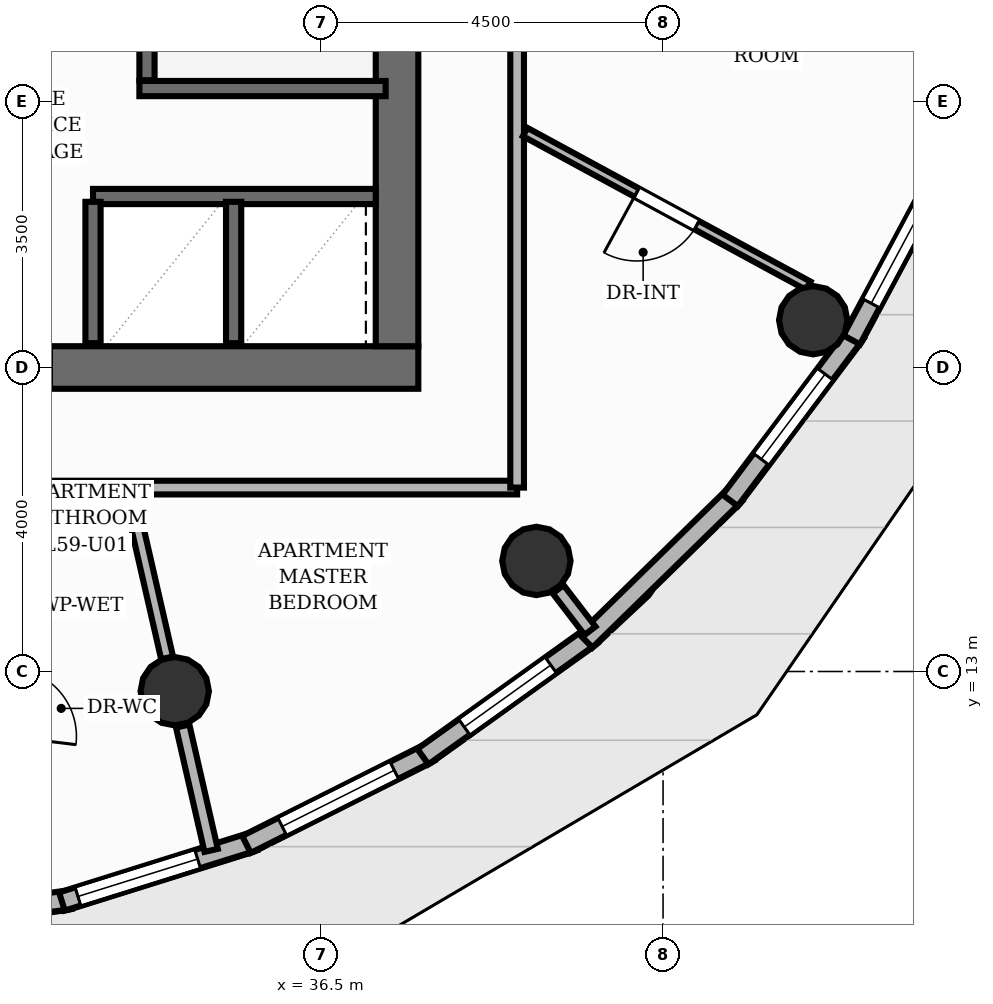
"""IFC4 building model, lengths in metres.
Left out: names, types, materials, properties, quantities, classifications, styles, units other than length and angle.
Written with IfcOpenShell. Run it as: python <this file> out.ifc"""

import sys

from ifc_helpers import new_model, si_unit, direction, frame, frame_2d, origin, origin_2d, place, context, subcontext, project, spatial, rectangle, circle, extrude, element, fill, save


model = new_model("IFC4")
c1 = context("Model", 3, precision=1e-05, world=origin(), true_north=direction((0.0, 1.0)))
c2 = subcontext(c1, "Body", "Model", "MODEL_VIEW")
j1 = project(units=[si_unit("LENGTHUNIT", "METRE"), si_unit("PLANEANGLEUNIT", "RADIAN")], contexts=[c1])
p1 = place(None, origin())
s1 = spatial("IfcSite", under=j1, at=p1, CompositionType="ELEMENT")
p2 = place(p1, origin())
s2 = spatial("IfcBuilding", under=s1, at=p2, CompositionType="ELEMENT")
p3 = place(p2, frame((0.0, 0.0, 198.24)))
s3 = spatial("IfcBuildingStorey", under=s2, at=p3, CompositionType="ELEMENT", Elevation=198.24)
p4 = place(p3, frame((26.22, 17.0, 0.0), z_axis=(0.0, 0.0, 1.0), x_axis=(1.0, 0.0, 0.0)))
e1 = element("IfcWall", 1, at=p4, inside=s3, PredefinedType="SHEAR", context=c2, shape_type="SweptSolid", body=[
    extrude(rectangle(XDim=11.56, YDim=0.56, at=frame_2d((5.78, 0.0))), origin(), (0.0, 0.0, 1.0), 3.2),
])
p5 = place(p4, frame((2.28, 0.0, 0.0)))
e2 = element("IfcOpeningElement", 2, at=p5, cuts=e1, PredefinedType="OPENING", context=c2, shape_type="SweptSolid", body=[
    extrude(rectangle(XDim=1.1, YDim=2.15, at=frame_2d((0.55, 1.075))), frame((0.0, 0.29, 0.0), z_axis=(0.0, -1.0, 0.0), x_axis=(1.0, 0.0, 0.0)), (0.0, 0.0, 1.0), 0.58),
])
p6 = place(p4, frame((5.83, 0.0, 0.0)))
e3 = element("IfcOpeningElement", 3, at=p6, cuts=e1, PredefinedType="OPENING", context=c2, shape_type="SweptSolid", body=[
    extrude(rectangle(XDim=0.9, YDim=2.1, at=frame_2d((0.45, 1.05))), frame((0.0, 0.29, 0.0), z_axis=(0.0, -1.0, 0.0), x_axis=(1.0, 0.0, 0.0)), (0.0, 0.0, 1.0), 0.58),
])
p7 = place(p3, frame((37.5, 17.28, 0.0), z_axis=(0.0, 0.0, 1.0), x_axis=(0.0, 1.0, 0.0)))
e4 = element("IfcWall", 4, at=p7, inside=s3, PredefinedType="SHEAR", context=c2, shape_type="SweptSolid", body=[
    extrude(rectangle(XDim=13.44, YDim=0.56, at=frame_2d((6.72, 0.0))), origin(), (0.0, 0.0, 1.0), 3.2),
])
for number, where, z_axis, x_axis in (
    (5, (34.575, 12.74, 0.0), (0.0, 0.0, 1.0), (1.0, 0.0, 0.0)),
    (6, (39.333, 14.455, 0.0), (0.0, 0.0, 1.0), (1.0, 0.0, 0.0)),
    (7, (42.975, 17.622, 0.0), (0.0, 0.0, 1.0), (1.0, 0.0, 0.0)),
):
    element("IfcColumn", number, at=place(p3, frame(where, z_axis=z_axis, x_axis=x_axis)), inside=s3, PredefinedType="COLUMN", context=c2, shape_type="SweptSolid", body=[
        extrude(circle(Radius=0.45, at=origin_2d()), origin(), (0.0, 0.0, 1.0), 3.2),
    ])
p8 = place(p3, frame((33.199, 9.998, 0.0), z_axis=(0.0, 0.0, 1.0), x_axis=(-0.990951844978, -0.134217886046, 0.0)))
e8 = element("IfcWall", 8, at=p8, inside=s3, PredefinedType="SOLIDWALL", context=c2, shape_type="SweptSolid", body=[
    extrude(rectangle(XDim=2.592, YDim=0.25, at=frame_2d((1.296, 0.0))), origin(), (0.0, 0.0, 1.0), 2.96),
])
p9 = place(p3, frame((35.621, 10.766, 0.0), z_axis=(0.0, 0.0, 1.0), x_axis=(-0.954307768746, -0.298825505122, 0.0)))
e9 = element("IfcWall", 9, at=p9, inside=s3, PredefinedType="SOLIDWALL", context=c2, shape_type="SweptSolid", body=[
    extrude(rectangle(XDim=2.651, YDim=0.25, at=frame_2d((1.326, 0.0))), origin(), (0.0, 0.0, 1.0), 2.96),
])
p10 = place(p9, frame((0.78, 0.0, 0.85)))
e10 = element("IfcOpeningElement", 10, at=p10, cuts=e9, PredefinedType="OPENING", context=c2, shape_type="SweptSolid", body=[
    extrude(rectangle(XDim=1.65, YDim=1.52, at=frame_2d((0.825, 0.76))), frame((0.0, 0.135, 0.0), z_axis=(0.0, -1.0, 0.0), x_axis=(1.0, 0.0, 0.0)), (0.0, 0.0, 1.0), 0.27),
])
p11 = place(p3, frame((37.934, 11.937, 0.0), z_axis=(0.0, 0.0, 1.0), x_axis=(-0.893757522153, -0.448550433724, 0.0)))
e11 = element("IfcWall", 11, at=p11, inside=s3, PredefinedType="SOLIDWALL", context=c2, shape_type="SweptSolid", body=[
    extrude(rectangle(XDim=2.702, YDim=0.25, at=frame_2d((1.351, 0.0))), origin(), (0.0, 0.0, 1.0), 2.96),
])
p12 = place(p11, frame((0.526, 0.0, 0.85)))
e12 = element("IfcOpeningElement", 12, at=p12, cuts=e11, PredefinedType="OPENING", context=c2, shape_type="SweptSolid", body=[
    extrude(rectangle(XDim=1.65, YDim=1.55, at=frame_2d((0.825, 0.775))), frame((0.0, 0.135, 0.0), z_axis=(0.0, -1.0, 0.0), x_axis=(1.0, 0.0, 0.0)), (0.0, 0.0, 1.0), 0.27),
])
p13 = place(p3, frame((40.066, 13.474, 0.0), z_axis=(0.0, 0.0, 1.0), x_axis=(-0.812997900305, -0.58226661771, 0.0)))
e13 = element("IfcWall", 13, at=p13, inside=s3, PredefinedType="SOLIDWALL", context=c2, shape_type="SweptSolid", body=[
    extrude(rectangle(XDim=2.739, YDim=0.25, at=frame_2d((1.369, 0.0))), origin(), (0.0, 0.0, 1.0), 2.96),
])
p14 = place(p13, frame((0.669, 0.0, 0.85)))
e14 = element("IfcOpeningElement", 14, at=p14, cuts=e13, PredefinedType="OPENING", context=c2, shape_type="SweptSolid", body=[
    extrude(rectangle(XDim=1.4, YDim=1.55, at=frame_2d((0.7, 0.775))), frame((0.0, 0.135, 0.0), z_axis=(0.0, -1.0, 0.0), x_axis=(1.0, 0.0, 0.0)), (0.0, 0.0, 1.0), 0.27),
])
p15 = place(p3, frame((41.955, 15.333, 0.0), z_axis=(0.0, 0.0, 1.0), x_axis=(-0.71485422762, -0.699273503898, 0.0)))
e15 = element("IfcWall", 15, at=p15, inside=s3, PredefinedType="SOLIDWALL", context=c2, shape_type="SweptSolid", body=[
    extrude(rectangle(XDim=2.758, YDim=0.25, at=frame_2d((1.379, 0.0))), origin(), (0.0, 0.0, 1.0), 2.96),
])
p16 = place(p3, frame((43.54, 17.456, 0.0), z_axis=(0.0, 0.0, 1.0), x_axis=(-0.600877762795, -0.799340924874, 0.0)))
e16 = element("IfcWall", 16, at=p16, inside=s3, PredefinedType="SOLIDWALL", context=c2, shape_type="SweptSolid", body=[
    extrude(rectangle(XDim=2.758, YDim=0.25, at=frame_2d((1.379, 0.0))), origin(), (0.0, 0.0, 1.0), 2.96),
])
p17 = place(p16, frame((0.679, 0.0, 0.85)))
e17 = element("IfcOpeningElement", 17, at=p17, cuts=e16, PredefinedType="OPENING", context=c2, shape_type="SweptSolid", body=[
    extrude(rectangle(XDim=1.4, YDim=1.55, at=frame_2d((0.7, 0.775))), frame((0.0, 0.135, 0.0), z_axis=(0.0, -1.0, 0.0), x_axis=(1.0, 0.0, 0.0)), (0.0, 0.0, 1.0), 0.27),
])
p18 = place(p3, frame((44.774, 19.779, 0.0), z_axis=(0.0, 0.0, 1.0), x_axis=(-0.472035862223, -0.88157934684, 0.0)))
e18 = element("IfcWall", 18, at=p18, inside=s3, PredefinedType="SOLIDWALL", context=c2, shape_type="SweptSolid", body=[
    extrude(rectangle(XDim=2.739, YDim=0.25, at=frame_2d((1.369, 0.0))), origin(), (0.0, 0.0, 1.0), 2.96),
])
p19 = place(p18, frame((0.544, 0.0, 0.85)))
e19 = element("IfcOpeningElement", 19, at=p19, cuts=e18, PredefinedType="OPENING", context=c2, shape_type="SweptSolid", body=[
    extrude(rectangle(XDim=1.65, YDim=1.55, at=frame_2d((0.825, 0.775))), frame((0.0, 0.135, 0.0), z_axis=(0.0, -1.0, 0.0), x_axis=(1.0, 0.0, 0.0)), (0.0, 0.0, 1.0), 0.27),
])
p20 = place(p3, frame((34.21, 20.78, 0.0), z_axis=(0.0, 0.0, 1.0), x_axis=(0.0, 1.0, 0.0)))
e20 = element("IfcWall", 20, at=p20, inside=s3, PredefinedType="SHEAR", context=c2, shape_type="SweptSolid", body=[
    extrude(rectangle(XDim=6.44, YDim=0.2, at=frame_2d((3.22, 0.0))), origin(), (0.0, 0.0, 1.0), 3.2),
])
p21 = place(p3, frame((34.11, 20.67, 0.0), z_axis=(0.0, 0.0, 1.0), x_axis=(1.0, 0.0, 0.0)))
e21 = element("IfcWall", 21, at=p21, inside=s3, PredefinedType="SHEAR", context=c2, shape_type="SweptSolid", body=[
    extrude(rectangle(XDim=3.24, YDim=0.2, at=frame_2d((1.62, 0.0))), origin(), (0.0, 0.0, 1.0), 3.2),
])
p22 = place(p3, frame((33.5, 19.25, 0.0), z_axis=(0.0, 0.0, 1.0), x_axis=(1.0, 0.0, 0.0)))
e22 = element("IfcWall", 22, at=p22, inside=s3, PredefinedType="SHEAR", context=c2, shape_type="SweptSolid", body=[
    extrude(rectangle(XDim=3.72, YDim=0.2, at=frame_2d((1.86, 0.0))), origin(), (0.0, 0.0, 1.0), 3.2),
])
for number, where, z_axis, x_axis in (
    (23, (33.5, 17.32, 0.0), (0.0, 0.0, 1.0), (0.0, 1.0, 0.0)),
    (24, (35.35, 17.32, 0.0), (0.0, 0.0, 1.0), (0.0, 1.0, 0.0)),
):
    element("IfcWall", number, at=place(p3, frame(where, z_axis=z_axis, x_axis=x_axis)), inside=s3, PredefinedType="SHEAR", context=c2, shape_type="SweptSolid", body=[
        extrude(rectangle(XDim=1.86, YDim=0.2, at=frame_2d((0.93, 0.0))), origin(), (0.0, 0.0, 1.0), 3.2),
    ])
p23 = place(p3, frame((34.68, 12.282, 0.0), z_axis=(0.0, 0.0, 1.0), x_axis=(0.222978827263, -0.97482328788, 0.0)))
e25 = element("IfcWall", 25, at=p23, inside=s3, PredefinedType="PARTITIONING", context=c2, shape_type="SweptSolid", body=[
    extrude(rectangle(XDim=1.678, YDim=0.18, at=frame_2d((0.839, 0.0))), origin(), (0.0, 0.0, 1.0), 2.403),
])
p24 = place(p3, frame((39.62, 14.082, 0.0), z_axis=(0.0, 0.0, 1.0), x_axis=(0.60904199592, -0.793137974885, 0.0)))
e26 = element("IfcWall", 26, at=p24, inside=s3, PredefinedType="PARTITIONING", context=c2, shape_type="SweptSolid", body=[
    extrude(rectangle(XDim=0.688, YDim=0.18, at=frame_2d((0.344, 0.0))), origin(), (0.0, 0.0, 1.0), 2.403),
])
p25 = place(p3, frame((39.08, 15.42, 0.0), z_axis=(0.0, 0.0, 1.0), x_axis=(-1.0, 0.0, 0.0)))
e27 = element("IfcWall", 27, at=p25, inside=s3, PredefinedType="PARTITIONING", context=c2, shape_type="SweptSolid", body=[
    extrude(rectangle(XDim=14.16, YDim=0.18, at=frame_2d((7.08, 0.0))), origin(), (0.0, 0.0, 1.0), 2.955),
])
p26 = place(p25, frame((8.155, 0.0, 0.0)))
e28 = element("IfcOpeningElement", 28, at=p26, cuts=e27, PredefinedType="OPENING", context=c2, shape_type="SweptSolid", body=[
    extrude(rectangle(XDim=1.05, YDim=2.15, at=frame_2d((0.525, 1.075))), frame((0.0, 0.1, 0.0), z_axis=(0.0, -1.0, 0.0), x_axis=(1.0, 0.0, 0.0)), (0.0, 0.0, 1.0), 0.2),
])
p27 = place(p3, frame((39.08, 30.508, 0.0), z_axis=(0.0, 0.0, 1.0), x_axis=(0.0, -1.0, 0.0)))
e29 = element("IfcWall", 29, at=p27, inside=s3, PredefinedType="PARTITIONING", context=c2, shape_type="SweptSolid", body=[
    extrude(rectangle(XDim=15.088, YDim=0.18, at=frame_2d((7.544, 0.0))), origin(), (0.0, 0.0, 1.0), 2.955),
])
p28 = place(p27, frame((7.548, 0.0, 0.0)))
e30 = element("IfcOpeningElement", 30, at=p28, cuts=e29, PredefinedType="OPENING", context=c2, shape_type="SweptSolid", body=[
    extrude(rectangle(XDim=1.05, YDim=2.15, at=frame_2d((0.525, 1.075))), frame((0.0, 0.1, 0.0), z_axis=(0.0, -1.0, 0.0), x_axis=(1.0, 0.0, 0.0)), (0.0, 0.0, 1.0), 0.2),
])
p29 = place(p3, frame((33.985, 15.323, 0.0), z_axis=(0.0, 0.0, 1.0), x_axis=(0.222969522248, -0.974825416241, 0.0)))
e31 = element("IfcWall", 31, at=p29, inside=s3, PredefinedType="PLUMBINGWALL", context=c2, shape_type="SweptSolid", body=[
    extrude(rectangle(XDim=2.199, YDim=0.16, at=frame_2d((1.099, 0.0))), origin(), (0.0, 0.0, 1.0), 2.403),
])
p30 = place(p3, frame((42.911, 18.075, 0.0), z_axis=(0.0, 0.0, 1.0), x_axis=(-0.878816171277, 0.477160494071, 0.0)))
e32 = element("IfcWall", 32, at=p30, inside=s3, PredefinedType="PARTITIONING", context=c2, shape_type="SweptSolid", body=[
    extrude(rectangle(XDim=4.239, YDim=0.125, at=frame_2d((2.12, 0.0))), origin(), (0.0, 0.0, 1.0), 2.403),
])
p31 = place(p30, frame((1.67, 0.0, 0.0)))
e33 = element("IfcOpeningElement", 33, at=p31, cuts=e32, PredefinedType="OPENING", context=c2, shape_type="SweptSolid", body=[
    extrude(rectangle(XDim=0.9, YDim=2.1, at=frame_2d((0.45, 1.05))), frame((0.0, 0.073, 0.0), z_axis=(0.0, -1.0, 0.0), x_axis=(1.0, 0.0, 0.0)), (0.0, 0.0, 1.0), 0.145),
])
p32 = place(p10, origin())
e34 = element("IfcWindow", 34, at=p32, inside=s3, PartitioningType="SINGLE_PANEL", PredefinedType="WINDOW", context=c2, shape_type="SweptSolid", body=[
    extrude(rectangle(XDim=1.65, YDim=1.52, at=frame_2d((0.825, 0.76))), frame((0.0, 0.03, 0.0), z_axis=(0.0, -1.0, 0.0), x_axis=(1.0, 0.0, 0.0)), (0.0, 0.0, 1.0), 0.06),
])
fill(e10, e34)
p33 = place(p12, origin())
e35 = element("IfcWindow", 35, at=p33, inside=s3, PartitioningType="SINGLE_PANEL", PredefinedType="WINDOW", context=c2, shape_type="SweptSolid", body=[
    extrude(rectangle(XDim=1.65, YDim=1.55, at=frame_2d((0.825, 0.775))), frame((0.0, 0.03, 0.0), z_axis=(0.0, -1.0, 0.0), x_axis=(1.0, 0.0, 0.0)), (0.0, 0.0, 1.0), 0.06),
])
fill(e12, e35)
p34 = place(p14, origin())
e36 = element("IfcWindow", 36, at=p34, inside=s3, PartitioningType="SINGLE_PANEL", PredefinedType="WINDOW", context=c2, shape_type="SweptSolid", body=[
    extrude(rectangle(XDim=1.4, YDim=1.55, at=frame_2d((0.7, 0.775))), frame((0.0, 0.03, 0.0), z_axis=(0.0, -1.0, 0.0), x_axis=(1.0, 0.0, 0.0)), (0.0, 0.0, 1.0), 0.06),
])
fill(e14, e36)
p35 = place(p17, origin())
e37 = element("IfcWindow", 37, at=p35, inside=s3, PartitioningType="SINGLE_PANEL", PredefinedType="WINDOW", context=c2, shape_type="SweptSolid", body=[
    extrude(rectangle(XDim=1.4, YDim=1.55, at=frame_2d((0.7, 0.775))), frame((0.0, 0.03, 0.0), z_axis=(0.0, -1.0, 0.0), x_axis=(1.0, 0.0, 0.0)), (0.0, 0.0, 1.0), 0.06),
])
fill(e17, e37)
p36 = place(p19, origin())
e38 = element("IfcWindow", 38, at=p36, inside=s3, PartitioningType="SINGLE_PANEL", PredefinedType="WINDOW", context=c2, shape_type="SweptSolid", body=[
    extrude(rectangle(XDim=1.65, YDim=1.55, at=frame_2d((0.825, 0.775))), frame((0.0, 0.03, 0.0), z_axis=(0.0, -1.0, 0.0), x_axis=(1.0, 0.0, 0.0)), (0.0, 0.0, 1.0), 0.06),
])
fill(e19, e38)
p37 = place(p31, origin())
e39 = element("IfcDoor", 39, at=p37, inside=s3, OperationType="SINGLE_SWING_RIGHT", PredefinedType="DOOR", context=c2, shape_type="SweptSolid", body=[
    extrude(rectangle(XDim=0.9, YDim=2.1, at=frame_2d((0.45, 1.05))), frame((0.0, 0.025, 0.0), z_axis=(0.0, -1.0, 0.0), x_axis=(1.0, 0.0, 0.0)), (0.0, 0.0, 1.0), 0.05),
])
fill(e33, e39)
save(model, sys.argv[1])
